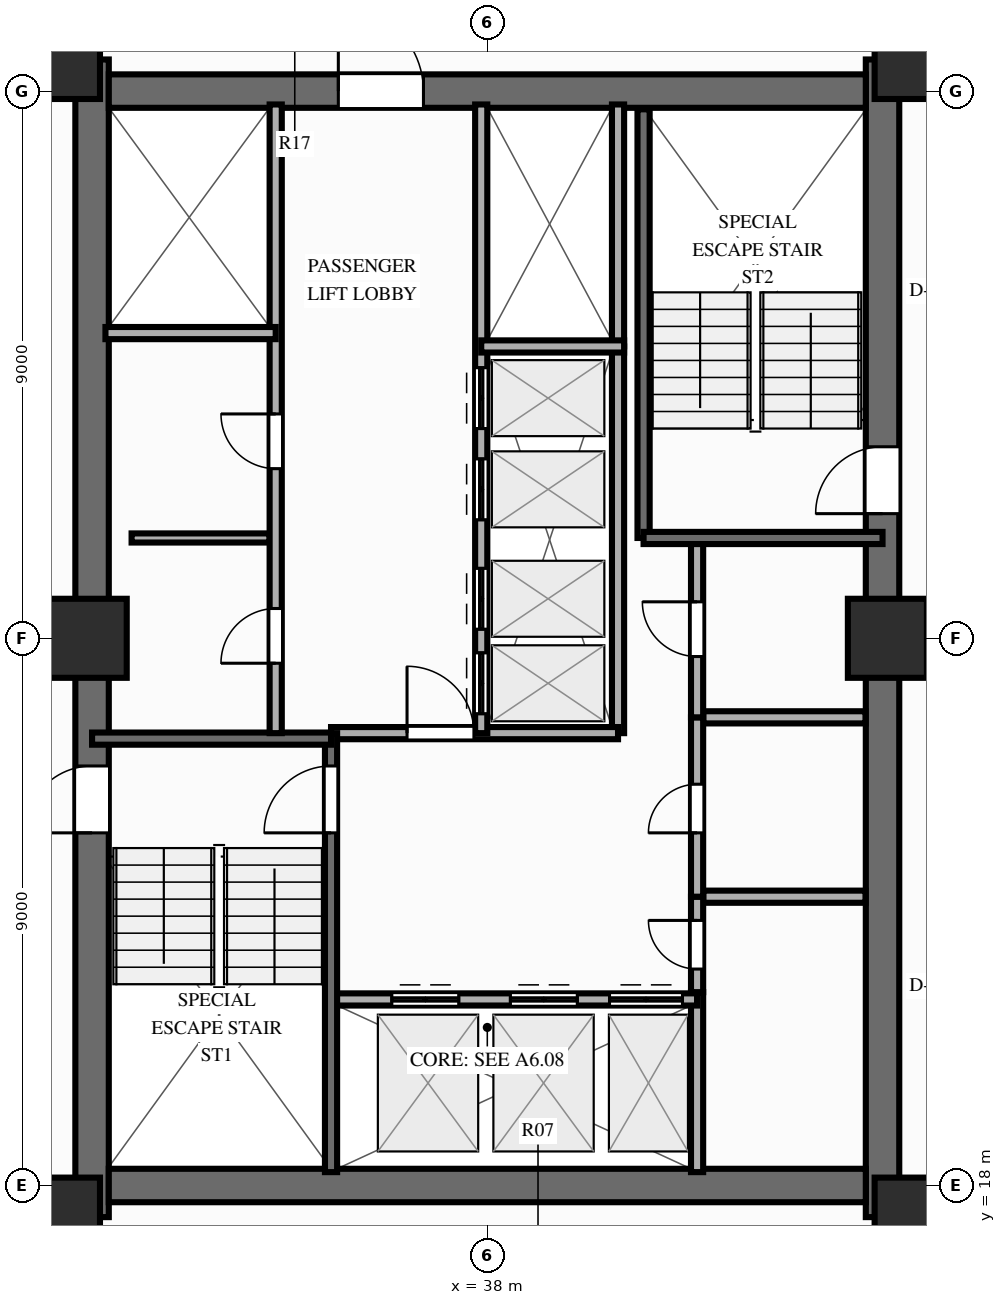
"""IFC4 building model, lengths in metres.
Left out: names, types, materials, properties, quantities, classifications, styles, units other than length and angle.
Written with IfcOpenShell. Run it as: python <this file> out.ifc"""

import sys

from ifc_helpers import new_model, si_unit, direction, frame, frame_2d, origin, origin_2d, place, context, subcontext, project, spatial, rectangle, extrude, source, transform, mapped, element, fill, save


model = new_model("IFC4")
c1 = context("Model", 3, precision=1e-05, world=origin(), true_north=direction((0.0, 1.0)))
c2 = subcontext(c1, "Body", "Model", "MODEL_VIEW")
j1 = project(units=[si_unit("LENGTHUNIT", "METRE"), si_unit("PLANEANGLEUNIT", "RADIAN")], contexts=[c1])
p1 = place(None, origin())
s1 = spatial("IfcSite", under=j1, at=p1, CompositionType="ELEMENT")
p2 = place(p1, origin())
s2 = spatial("IfcBuilding", under=s1, at=p2, CompositionType="ELEMENT")
p3 = place(p2, frame((0.0, 0.0, 95.85)))
s3 = spatial("IfcBuildingStorey", under=s2, at=p3, CompositionType="ELEMENT", Elevation=95.85)
p4 = place(p3, frame((31.5, 17.48, 0.0), z_axis=(0.0, 0.0, 1.0), x_axis=(0.0, 1.0, 0.0)))
e1 = element("IfcWall", 1, at=p4, inside=s3, PredefinedType="SHEAR", context=c2, shape_type="SweptSolid", body=[
    extrude(rectangle(XDim=19.04, YDim=0.55, at=frame_2d((9.52, 0.0))), origin(), (0.0, 0.0, 1.0), 3.0),
])
p5 = place(p4, frame((6.32, 0.0, 0.0)))
e2 = element("IfcOpeningElement", 2, at=p5, cuts=e1, PredefinedType="OPENING", context=c2, shape_type="SweptSolid", body=[
    extrude(rectangle(XDim=1.1, YDim=2.15, at=frame_2d((0.55, 1.075))), frame((0.0, 0.287, 0.0), z_axis=(0.0, -1.0, 0.0), x_axis=(1.0, 0.0, 0.0)), (0.0, 0.0, 1.0), 0.574),
])
p6 = place(p3, frame((44.5, 17.48, 0.0), z_axis=(0.0, 0.0, 1.0), x_axis=(0.0, 1.0, 0.0)))
e3 = element("IfcWall", 3, at=p6, inside=s3, PredefinedType="SHEAR", context=c2, shape_type="SweptSolid", body=[
    extrude(rectangle(XDim=19.04, YDim=0.55, at=frame_2d((9.52, 0.0))), origin(), (0.0, 0.0, 1.0), 3.0),
])
p7 = place(p6, frame((12.67, 0.0, 0.0), z_axis=(0.0, 0.0, 1.0), x_axis=(-1.0, 0.0, 0.0)))
e4 = element("IfcOpeningElement", 4, at=p7, cuts=e3, PredefinedType="OPENING", context=c2, shape_type="SweptSolid", body=[
    extrude(rectangle(XDim=1.1, YDim=2.15, at=frame_2d((0.55, 1.075))), frame((0.0, 0.287, 0.0), z_axis=(0.0, -1.0, 0.0), x_axis=(1.0, 0.0, 0.0)), (0.0, 0.0, 1.0), 0.574),
])
p8 = place(p3, frame((31.775, 18.0, 0.0), z_axis=(0.0, 0.0, 1.0), x_axis=(1.0, 0.0, 0.0)))
e5 = element("IfcWall", 5, at=p8, inside=s3, PredefinedType="SHEAR", context=c2, shape_type="SweptSolid", body=[
    extrude(rectangle(XDim=12.45, YDim=0.55, at=frame_2d((6.225, 0.0))), origin(), (0.0, 0.0, 1.0), 3.0),
])
p9 = place(p3, frame((31.775, 36.0, 0.0), z_axis=(0.0, 0.0, 1.0), x_axis=(1.0, 0.0, 0.0)))
e6 = element("IfcWall", 6, at=p9, inside=s3, PredefinedType="SHEAR", context=c2, shape_type="SweptSolid", body=[
    extrude(rectangle(XDim=12.45, YDim=0.55, at=frame_2d((6.225, 0.0))), origin(), (0.0, 0.0, 1.0), 3.0),
])
p10 = place(p9, frame((5.175, 0.0, 0.0), z_axis=(0.0, 0.0, 1.0), x_axis=(-1.0, 0.0, 0.0)))
e7 = element("IfcOpeningElement", 7, at=p10, cuts=e6, PredefinedType="OPENING", context=c2, shape_type="SweptSolid", body=[
    extrude(rectangle(XDim=1.4, YDim=2.15, at=frame_2d((0.7, 1.075))), frame((0.0, 0.287, 0.0), z_axis=(0.0, -1.0, 0.0), x_axis=(1.0, 0.0, 0.0)), (0.0, 0.0, 1.0), 0.574),
])
m1 = source(origin(), c2, "Body", "SweptSolid", [
    extrude(rectangle(XDim=1.3, YDim=1.3, at=origin_2d()), origin(), (0.0, 0.0, 1.0), 3.0),
])
for number, where, z_axis, x_axis in (
    (8, (30.98, 17.48, 0.0), (0.0, 0.0, 1.0), (1.0, 0.0, 0.0)),
    (9, (45.02, 17.48, 0.0), (0.0, 0.0, 1.0), (1.0, 0.0, 0.0)),
    (10, (30.98, 36.52, 0.0), (0.0, 0.0, 1.0), (1.0, 0.0, 0.0)),
    (11, (45.02, 36.52, 0.0), (0.0, 0.0, 1.0), (1.0, 0.0, 0.0)),
    (12, (31.42, 27.0, 0.0), (0.0, 0.0, 1.0), (1.0, 0.0, 0.0)),
    (13, (44.58, 27.0, 0.0), (0.0, 0.0, 1.0), (1.0, 0.0, 0.0)),
):
    element("IfcColumn", number, at=place(p3, frame(where, z_axis=z_axis, x_axis=x_axis)), inside=s3, PredefinedType="COLUMN", context=c2, shape_type="MappedRepresentation", body=[
        mapped(m1, transform((0.0, 0.0, 0.0), scale=1.0)),
    ])
p11 = place(p3, frame((32.15, 28.65, 0.0), z_axis=(0.0, 0.0, 1.0), x_axis=(1.0, 0.0, 0.0)))
e14 = element("IfcWall", 14, at=p11, inside=s3, PredefinedType="PARTITIONING", context=c2, shape_type="SweptSolid", body=[
    extrude(rectangle(XDim=2.27, YDim=0.15, at=frame_2d((1.135, 0.0))), origin(), (0.0, 0.0, 1.0), 2.14),
])
p12 = place(p3, frame((41.55, 22.75, 0.0), z_axis=(0.0, 0.0, 1.0), x_axis=(1.0, 0.0, 0.0)))
e15 = element("IfcWall", 15, at=p12, inside=s3, PredefinedType="PARTITIONING", context=c2, shape_type="SweptSolid", body=[
    extrude(rectangle(XDim=2.67, YDim=0.2, at=frame_2d((1.335, 0.0))), origin(), (0.0, 0.0, 1.0), 2.79),
])
p13 = place(p3, frame((41.55, 25.7, 0.0), z_axis=(0.0, 0.0, 1.0), x_axis=(1.0, 0.0, 0.0)))
e16 = element("IfcWall", 16, at=p13, inside=s3, PredefinedType="PARTITIONING", context=c2, shape_type="SweptSolid", body=[
    extrude(rectangle(XDim=2.67, YDim=0.2, at=frame_2d((1.335, 0.0))), origin(), (0.0, 0.0, 1.0), 2.14),
])
p14 = place(p3, frame((41.45, 18.22, 0.0), z_axis=(0.0, 0.0, 1.0), x_axis=(0.0, 1.0, 0.0)))
e17 = element("IfcWall", 17, at=p14, inside=s3, PredefinedType="PARTITIONING", context=c2, shape_type="SweptSolid", body=[
    extrude(rectangle(XDim=2.96, YDim=0.2, at=frame_2d((1.48, 0.0))), origin(), (0.0, 0.0, 1.0), 2.79),
])
p15 = place(p3, frame((41.45, 21.18, 0.0), z_axis=(0.0, 0.0, 1.0), x_axis=(0.0, 1.0, 0.0)))
e18 = element("IfcWall", 18, at=p15, inside=s3, PredefinedType="PARTITIONING", context=c2, shape_type="SweptSolid", body=[
    extrude(rectangle(XDim=1.57, YDim=0.2, at=frame_2d((0.785, 0.0))), origin(), (0.0, 0.0, 1.0), 2.79),
])
p16 = place(p15, frame((0.38, 0.0, 0.0)))
e19 = element("IfcOpeningElement", 19, at=p16, cuts=e18, PredefinedType="OPENING", context=c2, shape_type="SweptSolid", body=[
    extrude(rectangle(XDim=0.8, YDim=2.05, at=frame_2d((0.4, 1.025))), frame((0.0, 0.112, 0.0), z_axis=(0.0, -1.0, 0.0), x_axis=(1.0, 0.0, 0.0)), (0.0, 0.0, 1.0), 0.224),
])
p17 = place(p3, frame((41.45, 22.75, 0.0), z_axis=(0.0, 0.0, 1.0), x_axis=(0.0, 1.0, 0.0)))
e20 = element("IfcWall", 20, at=p17, inside=s3, PredefinedType="PARTITIONING", context=c2, shape_type="SweptSolid", body=[
    extrude(rectangle(XDim=2.95, YDim=0.2, at=frame_2d((1.475, 0.0))), origin(), (0.0, 0.0, 1.0), 2.79),
])
p18 = place(p17, frame((1.05, 0.0, 0.0)))
e21 = element("IfcOpeningElement", 21, at=p18, cuts=e20, PredefinedType="OPENING", context=c2, shape_type="SweptSolid", body=[
    extrude(rectangle(XDim=0.8, YDim=2.05, at=frame_2d((0.4, 1.025))), frame((0.0, 0.112, 0.0), z_axis=(0.0, -1.0, 0.0), x_axis=(1.0, 0.0, 0.0)), (0.0, 0.0, 1.0), 0.224),
])
p19 = place(p3, frame((41.45, 25.7, 0.0), z_axis=(0.0, 0.0, 1.0), x_axis=(0.0, 1.0, 0.0)))
e22 = element("IfcWall", 22, at=p19, inside=s3, PredefinedType="PARTITIONING", context=c2, shape_type="SweptSolid", body=[
    extrude(rectangle(XDim=2.9, YDim=0.2, at=frame_2d((1.45, 0.0))), origin(), (0.0, 0.0, 1.0), 2.79),
])
p20 = place(p19, frame((1.0, 0.0, 0.0)))
e23 = element("IfcOpeningElement", 23, at=p20, cuts=e22, PredefinedType="OPENING", context=c2, shape_type="SweptSolid", body=[
    extrude(rectangle(XDim=0.9, YDim=2.1, at=frame_2d((0.45, 1.05))), frame((0.0, 0.112, 0.0), z_axis=(0.0, -1.0, 0.0), x_axis=(1.0, 0.0, 0.0)), (0.0, 0.0, 1.0), 0.224),
])
p21 = place(p3, frame((40.15, 25.44, 0.0), z_axis=(0.0, 0.0, 1.0), x_axis=(0.0, 1.0, 0.0)))
e24 = element("IfcWall", 24, at=p21, inside=s3, PredefinedType="PARTITIONING", context=c2, shape_type="SweptSolid", body=[
    extrude(rectangle(XDim=6.36, YDim=0.2, at=frame_2d((3.18, 0.0))), origin(), (0.0, 0.0, 1.0), 2.79),
])
p22 = place(p3, frame((40.15, 31.8, 0.0), z_axis=(0.0, 0.0, 1.0), x_axis=(0.0, 1.0, 0.0)))
e25 = element("IfcWall", 25, at=p22, inside=s3, PredefinedType="PARTITIONING", context=c2, shape_type="SweptSolid", body=[
    extrude(rectangle(XDim=3.98, YDim=0.2, at=frame_2d((1.99, 0.0))), origin(), (0.0, 0.0, 1.0), 2.79),
])
p23 = place(p3, frame((35.43, 21.06, 0.0), z_axis=(0.0, 0.0, 1.0), x_axis=(1.0, 0.0, 0.0)))
e26 = element("IfcWall", 26, at=p23, inside=s3, PredefinedType="PARTITIONING", context=c2, shape_type="SweptSolid", body=[
    extrude(rectangle(XDim=6.02, YDim=0.2, at=frame_2d((3.01, 0.0))), origin(), (0.0, 0.0, 1.0), 2.79),
])
p24 = place(p23, frame((1.0, 0.0, 0.0)))
e27 = element("IfcOpeningElement", 27, at=p24, cuts=e26, PredefinedType="OPENING", context=c2, shape_type="SweptSolid", body=[
    extrude(rectangle(XDim=1.1, YDim=2.15, at=frame_2d((0.55, 1.075))), frame((0.0, 0.112, 0.0), z_axis=(0.0, -1.0, 0.0), x_axis=(1.0, 0.0, 0.0)), (0.0, 0.0, 1.0), 0.224),
])
p25 = place(p23, frame((2.95, 0.0, 0.0)))
e28 = element("IfcOpeningElement", 28, at=p25, cuts=e26, PredefinedType="OPENING", context=c2, shape_type="SweptSolid", body=[
    extrude(rectangle(XDim=1.1, YDim=2.15, at=frame_2d((0.55, 1.075))), frame((0.0, 0.112, 0.0), z_axis=(0.0, -1.0, 0.0), x_axis=(1.0, 0.0, 0.0)), (0.0, 0.0, 1.0), 0.224),
])
p26 = place(p23, frame((4.58, 0.0, 0.0)))
e29 = element("IfcOpeningElement", 29, at=p26, cuts=e26, PredefinedType="OPENING", context=c2, shape_type="SweptSolid", body=[
    extrude(rectangle(XDim=1.2, YDim=2.15, at=frame_2d((0.6, 1.075))), frame((0.0, 0.112, 0.0), z_axis=(0.0, -1.0, 0.0), x_axis=(1.0, 0.0, 0.0)), (0.0, 0.0, 1.0), 0.224),
])
p27 = place(p3, frame((35.43, 25.44, 0.0), z_axis=(0.0, 0.0, 1.0), x_axis=(1.0, 0.0, 0.0)))
e30 = element("IfcWall", 30, at=p27, inside=s3, PredefinedType="PARTITIONING", context=c2, shape_type="SweptSolid", body=[
    extrude(rectangle(XDim=4.72, YDim=0.2, at=frame_2d((2.36, 0.0))), origin(), (0.0, 0.0, 1.0), 2.79),
])
p28 = place(p27, frame((1.25, 0.0, 0.0)))
e31 = element("IfcOpeningElement", 31, at=p28, cuts=e30, PredefinedType="OPENING", context=c2, shape_type="SweptSolid", body=[
    extrude(rectangle(XDim=1.1, YDim=2.15, at=frame_2d((0.55, 1.075))), frame((0.0, 0.112, 0.0), z_axis=(0.0, -1.0, 0.0), x_axis=(1.0, 0.0, 0.0)), (0.0, 0.0, 1.0), 0.224),
])
p29 = place(p3, frame((35.43, 18.22, 0.0), z_axis=(0.0, 0.0, 1.0), x_axis=(0.0, 1.0, 0.0)))
e32 = element("IfcWall", 32, at=p29, inside=s3, PredefinedType="SOLIDWALL", context=c2, shape_type="SweptSolid", body=[
    extrude(rectangle(XDim=7.22, YDim=0.2, at=frame_2d((3.61, 0.0))), origin(), (0.0, 0.0, 1.0), 2.79),
])
p30 = place(p29, frame((6.68, 0.0, 0.0), z_axis=(0.0, 0.0, 1.0), x_axis=(-1.0, 0.0, 0.0)))
e33 = element("IfcOpeningElement", 33, at=p30, cuts=e32, PredefinedType="OPENING", context=c2, shape_type="SweptSolid", body=[
    extrude(rectangle(XDim=1.1, YDim=2.15, at=frame_2d((0.55, 1.075))), frame((0.0, 0.112, 0.0), z_axis=(0.0, -1.0, 0.0), x_axis=(1.0, 0.0, 0.0)), (0.0, 0.0, 1.0), 0.224),
])
p31 = place(p3, frame((31.5, 25.35, 0.0), z_axis=(0.0, 0.0, 1.0), x_axis=(1.0, 0.0, 0.0)))
e34 = element("IfcWall", 34, at=p31, inside=s3, PredefinedType="SOLIDWALL", context=c2, shape_type="SweptSolid", body=[
    extrude(rectangle(XDim=3.93, YDim=0.2, at=frame_2d((1.965, 0.0))), origin(), (0.0, 0.0, 1.0), 2.79),
])
p32 = place(p3, frame((40.57, 28.65, 0.0), z_axis=(0.0, 0.0, 1.0), x_axis=(0.0, 1.0, 0.0)))
e35 = element("IfcWall", 35, at=p32, inside=s3, PredefinedType="SOLIDWALL", context=c2, shape_type="SweptSolid", body=[
    extrude(rectangle(XDim=7.05, YDim=0.2, at=frame_2d((3.525, 0.0))), origin(), (0.0, 0.0, 1.0), 2.79),
])
p33 = place(p3, frame((40.57, 28.65, 0.0), z_axis=(0.0, 0.0, 1.0), x_axis=(1.0, 0.0, 0.0)))
e36 = element("IfcWall", 36, at=p33, inside=s3, PredefinedType="SOLIDWALL", context=c2, shape_type="SweptSolid", body=[
    extrude(rectangle(XDim=3.93, YDim=0.2, at=frame_2d((1.965, 0.0))), origin(), (0.0, 0.0, 1.0), 2.79),
])
p34 = place(p3, frame((34.52, 25.44, 0.0), z_axis=(0.0, 0.0, 1.0), x_axis=(0.0, 1.0, 0.0)))
e37 = element("IfcWall", 37, at=p34, inside=s3, PredefinedType="PARTITIONING", context=c2, shape_type="SweptSolid", body=[
    extrude(rectangle(XDim=10.34, YDim=0.2, at=frame_2d((5.17, 0.0))), origin(), (0.0, 0.0, 1.0), 2.79),
])
p35 = place(p34, frame((1.15, 0.0, 0.0)))
e38 = element("IfcOpeningElement", 38, at=p35, cuts=e37, PredefinedType="OPENING", context=c2, shape_type="SweptSolid", body=[
    extrude(rectangle(XDim=0.9, YDim=2.1, at=frame_2d((0.45, 1.05))), frame((0.0, 0.112, 0.0), z_axis=(0.0, -1.0, 0.0), x_axis=(1.0, 0.0, 0.0)), (0.0, 0.0, 1.0), 0.224),
])
p36 = place(p34, frame((4.35, 0.0, 0.0)))
e39 = element("IfcOpeningElement", 39, at=p36, cuts=e37, PredefinedType="OPENING", context=c2, shape_type="SweptSolid", body=[
    extrude(rectangle(XDim=0.9, YDim=2.1, at=frame_2d((0.45, 1.05))), frame((0.0, 0.112, 0.0), z_axis=(0.0, -1.0, 0.0), x_axis=(1.0, 0.0, 0.0)), (0.0, 0.0, 1.0), 0.224),
])
p37 = place(p3, frame((31.72, 32.02, 0.0), z_axis=(0.0, 0.0, 1.0), x_axis=(1.0, 0.0, 0.0)))
e40 = element("IfcWall", 40, at=p37, inside=s3, PredefinedType="PARTITIONING", context=c2, shape_type="SweptSolid", body=[
    extrude(rectangle(XDim=2.8, YDim=0.2, at=frame_2d((1.4, 0.0))), origin(), (0.0, 0.0, 1.0), 2.79),
])
p38 = place(p3, frame((37.9, 25.44, 0.0), z_axis=(0.0, 0.0, 1.0), x_axis=(0.0, 1.0, 0.0)))
e41 = element("IfcWall", 41, at=p38, inside=s3, PredefinedType="PARTITIONING", context=c2, shape_type="SweptSolid", body=[
    extrude(rectangle(XDim=10.34, YDim=0.2, at=frame_2d((5.17, 0.0))), origin(), (0.0, 0.0, 1.0), 2.79),
])
p39 = place(p38, frame((0.32, 0.0, 0.0)))
e42 = element("IfcOpeningElement", 42, at=p39, cuts=e41, PredefinedType="OPENING", context=c2, shape_type="SweptSolid", body=[
    extrude(rectangle(XDim=1.0, YDim=2.15, at=frame_2d((0.5, 1.075))), frame((0.0, 0.112, 0.0), z_axis=(0.0, -1.0, 0.0), x_axis=(1.0, 0.0, 0.0)), (0.0, 0.0, 1.0), 0.224),
])
p40 = place(p38, frame((1.71, 0.0, 0.0)))
e43 = element("IfcOpeningElement", 43, at=p40, cuts=e41, PredefinedType="OPENING", context=c2, shape_type="SweptSolid", body=[
    extrude(rectangle(XDim=1.0, YDim=2.15, at=frame_2d((0.5, 1.075))), frame((0.0, 0.112, 0.0), z_axis=(0.0, -1.0, 0.0), x_axis=(1.0, 0.0, 0.0)), (0.0, 0.0, 1.0), 0.224),
])
p41 = place(p38, frame((3.51, 0.0, 0.0)))
e44 = element("IfcOpeningElement", 44, at=p41, cuts=e41, PredefinedType="OPENING", context=c2, shape_type="SweptSolid", body=[
    extrude(rectangle(XDim=1.0, YDim=2.15, at=frame_2d((0.5, 1.075))), frame((0.0, 0.112, 0.0), z_axis=(0.0, -1.0, 0.0), x_axis=(1.0, 0.0, 0.0)), (0.0, 0.0, 1.0), 0.224),
])
p42 = place(p38, frame((5.01, 0.0, 0.0)))
e45 = element("IfcOpeningElement", 45, at=p42, cuts=e41, PredefinedType="OPENING", context=c2, shape_type="SweptSolid", body=[
    extrude(rectangle(XDim=1.0, YDim=2.15, at=frame_2d((0.5, 1.075))), frame((0.0, 0.112, 0.0), z_axis=(0.0, -1.0, 0.0), x_axis=(1.0, 0.0, 0.0)), (0.0, 0.0, 1.0), 0.224),
])
p43 = place(p3, frame((37.9, 31.8, 0.0), z_axis=(0.0, 0.0, 1.0), x_axis=(1.0, 0.0, 0.0)))
e46 = element("IfcWall", 46, at=p43, inside=s3, PredefinedType="PARTITIONING", context=c2, shape_type="SweptSolid", body=[
    extrude(rectangle(XDim=2.35, YDim=0.2, at=frame_2d((1.175, 0.0))), origin(), (0.0, 0.0, 1.0), 2.79),
])
m2 = source(origin(), c2, "Body", "SweptSolid", [
    extrude(rectangle(XDim=1.1, YDim=2.15, at=frame_2d((0.55, 1.075))), frame((0.0, 0.025, 0.0), z_axis=(0.0, -1.0, 0.0), x_axis=(1.0, 0.0, 0.0)), (0.0, 0.0, 1.0), 0.05),
])
p44 = place(p5, origin())
e47 = element("IfcDoor", 47, at=p44, inside=s3, OperationType="SINGLE_SWING_LEFT", PredefinedType="DOOR", context=c2, shape_type="MappedRepresentation", body=[
    mapped(m2, transform((0.0, 0.0, 0.0), scale=1.0)),
])
fill(e2, e47)
p45 = place(p7, origin())
e48 = element("IfcDoor", 48, at=p45, inside=s3, OperationType="SINGLE_SWING_RIGHT", PredefinedType="DOOR", context=c2, shape_type="MappedRepresentation", body=[
    mapped(m2, transform((0.0, 0.0, 0.0), scale=1.0)),
])
fill(e4, e48)
m3 = source(origin(), c2, "Body", "SweptSolid", [
    extrude(rectangle(XDim=1.4, YDim=2.15, at=frame_2d((0.7, 1.075))), frame((0.0, 0.025, 0.0), z_axis=(0.0, -1.0, 0.0), x_axis=(1.0, 0.0, 0.0)), (0.0, 0.0, 1.0), 0.05),
])
p46 = place(p10, origin())
e49 = element("IfcDoor", 49, at=p46, inside=s3, OperationType="SINGLE_SWING_RIGHT", PredefinedType="DOOR", context=c2, shape_type="MappedRepresentation", body=[
    mapped(m3, transform((0.0, 0.0, 0.0), scale=1.0)),
])
fill(e7, e49)
m4 = source(origin(), c2, "Body", "SweptSolid", [
    extrude(rectangle(XDim=0.8, YDim=2.05, at=frame_2d((0.4, 1.025))), frame((0.0, 0.025, 0.0), z_axis=(0.0, -1.0, 0.0), x_axis=(1.0, 0.0, 0.0)), (0.0, 0.0, 1.0), 0.05),
])
p47 = place(p16, origin())
e50 = element("IfcDoor", 50, at=p47, inside=s3, OperationType="SINGLE_SWING_RIGHT", PredefinedType="DOOR", context=c2, shape_type="MappedRepresentation", body=[
    mapped(m4, transform((0.0, 0.0, 0.0), scale=1.0)),
])
fill(e19, e50)
p48 = place(p18, origin())
e51 = element("IfcDoor", 51, at=p48, inside=s3, OperationType="SINGLE_SWING_LEFT", PredefinedType="DOOR", context=c2, shape_type="MappedRepresentation", body=[
    mapped(m4, transform((0.0, 0.0, 0.0), scale=1.0)),
])
fill(e21, e51)
m5 = source(origin(), c2, "Body", "SweptSolid", [
    extrude(rectangle(XDim=0.9, YDim=2.1, at=frame_2d((0.45, 1.05))), frame((0.0, 0.025, 0.0), z_axis=(0.0, -1.0, 0.0), x_axis=(1.0, 0.0, 0.0)), (0.0, 0.0, 1.0), 0.05),
])
p49 = place(p20, origin())
e52 = element("IfcDoor", 52, at=p49, inside=s3, OperationType="SINGLE_SWING_RIGHT", PredefinedType="DOOR", context=c2, shape_type="MappedRepresentation", body=[
    mapped(m5, transform((0.0, 0.0, 0.0), scale=1.0)),
])
fill(e23, e52)
p50 = place(p24, origin())
e53 = element("IfcDoor", 53, at=p50, inside=s3, OperationType="DOUBLE_DOOR_SLIDING", PredefinedType="DOOR", context=c2, shape_type="MappedRepresentation", body=[
    mapped(m2, transform((0.0, 0.0, 0.0), scale=1.0)),
])
fill(e27, e53)
p51 = place(p25, origin())
e54 = element("IfcDoor", 54, at=p51, inside=s3, OperationType="DOUBLE_DOOR_SLIDING", PredefinedType="DOOR", context=c2, shape_type="MappedRepresentation", body=[
    mapped(m2, transform((0.0, 0.0, 0.0), scale=1.0)),
])
fill(e28, e54)
m6 = source(origin(), c2, "Body", "SweptSolid", [
    extrude(rectangle(XDim=1.2, YDim=2.15, at=frame_2d((0.6, 1.075))), frame((0.0, 0.025, 0.0), z_axis=(0.0, -1.0, 0.0), x_axis=(1.0, 0.0, 0.0)), (0.0, 0.0, 1.0), 0.05),
])
p52 = place(p26, origin())
e55 = element("IfcDoor", 55, at=p52, inside=s3, OperationType="DOUBLE_DOOR_SLIDING", PredefinedType="DOOR", context=c2, shape_type="MappedRepresentation", body=[
    mapped(m6, transform((0.0, 0.0, 0.0), scale=1.0)),
])
fill(e29, e55)
p53 = place(p28, origin())
e56 = element("IfcDoor", 56, at=p53, inside=s3, OperationType="SINGLE_SWING_LEFT", PredefinedType="DOOR", context=c2, shape_type="MappedRepresentation", body=[
    mapped(m2, transform((0.0, 0.0, 0.0), scale=1.0)),
])
fill(e31, e56)
p54 = place(p30, origin())
e57 = element("IfcDoor", 57, at=p54, inside=s3, OperationType="SINGLE_SWING_RIGHT", PredefinedType="DOOR", context=c2, shape_type="MappedRepresentation", body=[
    mapped(m2, transform((0.0, 0.0, 0.0), scale=1.0)),
])
fill(e33, e57)
p55 = place(p35, origin())
e58 = element("IfcDoor", 58, at=p55, inside=s3, OperationType="SINGLE_SWING_LEFT", PredefinedType="DOOR", context=c2, shape_type="MappedRepresentation", body=[
    mapped(m5, transform((0.0, 0.0, 0.0), scale=1.0)),
])
fill(e38, e58)
p56 = place(p36, origin())
e59 = element("IfcDoor", 59, at=p56, inside=s3, OperationType="SINGLE_SWING_RIGHT", PredefinedType="DOOR", context=c2, shape_type="MappedRepresentation", body=[
    mapped(m5, transform((0.0, 0.0, 0.0), scale=1.0)),
])
fill(e39, e59)
m7 = source(origin(), c2, "Body", "SweptSolid", [
    extrude(rectangle(XDim=1.0, YDim=2.15, at=frame_2d((0.5, 1.075))), frame((0.0, 0.025, 0.0), z_axis=(0.0, -1.0, 0.0), x_axis=(1.0, 0.0, 0.0)), (0.0, 0.0, 1.0), 0.05),
])
p57 = place(p39, origin())
e60 = element("IfcDoor", 60, at=p57, inside=s3, OperationType="DOUBLE_DOOR_SLIDING", PredefinedType="DOOR", context=c2, shape_type="MappedRepresentation", body=[
    mapped(m7, transform((0.0, 0.0, 0.0), scale=1.0)),
])
fill(e42, e60)
p58 = place(p40, origin())
e61 = element("IfcDoor", 61, at=p58, inside=s3, OperationType="DOUBLE_DOOR_SLIDING", PredefinedType="DOOR", context=c2, shape_type="MappedRepresentation", body=[
    mapped(m7, transform((0.0, 0.0, 0.0), scale=1.0)),
])
fill(e43, e61)
p59 = place(p41, origin())
e62 = element("IfcDoor", 62, at=p59, inside=s3, OperationType="DOUBLE_DOOR_SLIDING", PredefinedType="DOOR", context=c2, shape_type="MappedRepresentation", body=[
    mapped(m7, transform((0.0, 0.0, 0.0), scale=1.0)),
])
fill(e44, e62)
p60 = place(p42, origin())
e63 = element("IfcDoor", 63, at=p60, inside=s3, OperationType="DOUBLE_DOOR_SLIDING", PredefinedType="DOOR", context=c2, shape_type="MappedRepresentation", body=[
    mapped(m7, transform((0.0, 0.0, 0.0), scale=1.0)),
])
fill(e45, e63)
save(model, sys.argv[1])
